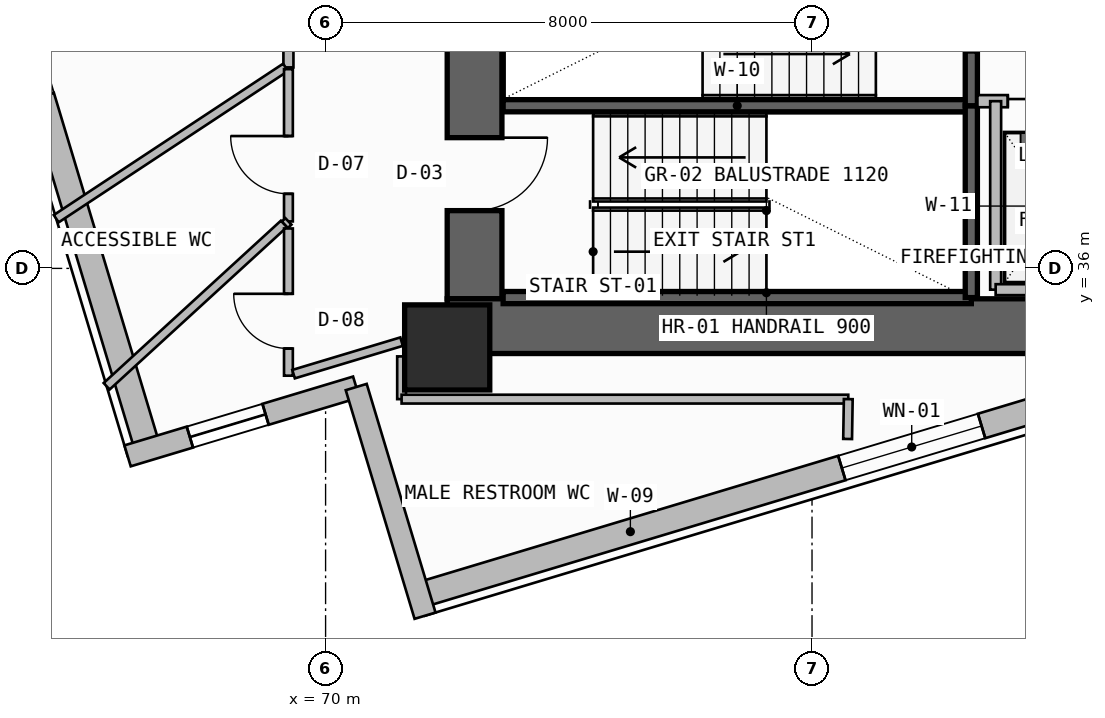
"""IFC4 building model, lengths in metres.
Left out: names, types, materials, properties, quantities, classifications, styles, units other than length and angle.
Written with IfcOpenShell. Run it as: python <this file> out.ifc"""

import sys

from ifc_helpers import new_model, si_unit, direction, frame, frame_2d, origin, origin_2d, place, context, subcontext, project, spatial, rectangle, extrude, element, fill, save


model = new_model("IFC4")
c1 = context("Model", 3, precision=1e-05, world=origin(), true_north=direction((0.0, 1.0)))
c2 = subcontext(c1, "Body", "Model", "MODEL_VIEW")
j1 = project(units=[si_unit("LENGTHUNIT", "METRE"), si_unit("PLANEANGLEUNIT", "RADIAN")], contexts=[c1])
p1 = place(None, origin())
s1 = spatial("IfcSite", under=j1, at=p1, CompositionType="ELEMENT")
p2 = place(p1, origin())
s2 = spatial("IfcBuilding", under=s1, at=p2, CompositionType="ELEMENT")
p3 = place(p2, frame((0.0, 0.0, 157.5)))
s3 = spatial("IfcBuildingStorey", under=s2, at=p3, CompositionType="ELEMENT", Elevation=157.5)
p4 = place(p3, frame((72.45, 35.5, -0.26), z_axis=(0.0, 0.0, 1.0), x_axis=(0.0, 1.0, 0.0)))
e1 = element("IfcWall", 1, at=p4, inside=s3, PredefinedType="SHEAR", context=c2, shape_type="SweptSolid", body=[
    extrude(rectangle(XDim=7.85, YDim=0.9, at=frame_2d((3.925, 0.0))), origin(), (0.0, 0.0, 1.0), 3.6),
])
p5 = place(p4, frame((1.45, 0.0, 0.26)))
e2 = element("IfcOpeningElement", 2, at=p5, cuts=e1, PredefinedType="OPENING", context=c2, shape_type="SweptSolid", body=[
    extrude(rectangle(XDim=1.2, YDim=2.2, at=frame_2d((0.6, 1.1))), frame((0.0, 0.46, 0.0), z_axis=(0.0, -1.0, 0.0), x_axis=(1.0, 0.0, 0.0)), (0.0, 0.0, 1.0), 0.92),
])
p6 = place(p3, frame((72.0, 35.05, -0.26), z_axis=(0.0, 0.0, 1.0), x_axis=(1.0, 0.0, 0.0)))
e3 = element("IfcWall", 3, at=p6, inside=s3, PredefinedType="SHEAR", context=c2, shape_type="SweptSolid", body=[
    extrude(rectangle(XDim=13.9, YDim=0.9, at=frame_2d((6.95, 0.0))), origin(), (0.0, 0.0, 1.0), 3.6),
])
p7 = place(p3, frame((72.0, 34.7, 0.0), z_axis=(0.0, 0.0, 1.0), x_axis=(1.0, 0.0, 0.0)))
e4 = element("IfcColumn", 4, at=p7, inside=s3, PredefinedType="COLUMN", context=c2, shape_type="SweptSolid", body=[
    extrude(rectangle(XDim=1.4, YDim=1.4, at=origin_2d()), origin(), (0.0, 0.0, 1.0), 3.6),
])
p8 = place(p3, frame((71.535, 30.624, 0.0), z_axis=(0.0, 0.0, 1.0), x_axis=(0.957571099539, 0.288197136226, 0.0)))
e5 = element("IfcWall", 5, at=p8, inside=s3, PredefinedType="SOLIDWALL", context=c2, shape_type="SweptSolid", body=[
    extrude(rectangle(XDim=12.236, YDim=0.42, at=frame_2d((6.118, 0.0))), origin(), (0.0, 0.0, 1.0), 3.34),
])
p9 = place(p8, frame((7.264, 0.0, 1.2)))
e6 = element("IfcOpeningElement", 6, at=p9, cuts=e5, PredefinedType="OPENING", context=c2, shape_type="SweptSolid", body=[
    extrude(rectangle(XDim=2.4, YDim=0.9, at=frame_2d((1.2, 0.45))), frame((0.0, 0.22, 0.0), z_axis=(0.0, -1.0, 0.0), x_axis=(1.0, 0.0, 0.0)), (0.0, 0.0, 1.0), 0.44),
])
p10 = place(p3, frame((63.221, 45.834, 0.0), z_axis=(0.0, 0.0, 1.0), x_axis=(0.288202962273, -0.957569346072, 0.0)))
e7 = element("IfcWall", 7, at=p10, inside=s3, PredefinedType="SOLIDWALL", context=c2, shape_type="SweptSolid", body=[
    extrude(rectangle(XDim=13.384, YDim=0.42, at=frame_2d((6.692, 0.0))), origin(), (0.0, 0.0, 1.0), 2.725),
])
p11 = place(p10, frame((5.517, 0.0, 1.2)))
e8 = element("IfcOpeningElement", 8, at=p11, cuts=e7, PredefinedType="OPENING", context=c2, shape_type="SweptSolid", body=[
    extrude(rectangle(XDim=1.8, YDim=0.9, at=frame_2d((0.9, 0.45))), frame((0.0, 0.22, 0.0), z_axis=(0.0, -1.0, 0.0), x_axis=(1.0, 0.0, 0.0)), (0.0, 0.0, 1.0), 0.44),
])
p12 = place(p3, frame((66.743, 32.917, 0.0), z_axis=(0.0, 0.0, 1.0), x_axis=(0.957584687378, 0.288151985068, 0.0)))
e9 = element("IfcWall", 9, at=p12, inside=s3, PredefinedType="SOLIDWALL", context=c2, shape_type="SweptSolid", body=[
    extrude(rectangle(XDim=3.927, YDim=0.36, at=frame_2d((1.963, 0.0))), origin(), (0.0, 0.0, 1.0), 3.34),
])
p13 = place(p12, frame((1.07, 0.0, 0.45)))
e10 = element("IfcOpeningElement", 10, at=p13, cuts=e9, PredefinedType="OPENING", context=c2, shape_type="SweptSolid", body=[
    extrude(rectangle(XDim=1.3, YDim=2.4, at=frame_2d((0.65, 1.2))), frame((0.0, 0.19, 0.0), z_axis=(0.0, -1.0, 0.0), x_axis=(1.0, 0.0, 0.0)), (0.0, 0.0, 1.0), 0.38),
])
p14 = place(p3, frame((70.504, 34.049, 0.0), z_axis=(0.0, 0.0, 1.0), x_axis=(0.288169140251, -0.957579524952, 0.0)))
e11 = element("IfcWall", 11, at=p14, inside=s3, PredefinedType="SOLIDWALL", context=c2, shape_type="SweptSolid", body=[
    extrude(rectangle(XDim=3.927, YDim=0.36, at=frame_2d((1.963, 0.0))), origin(), (0.0, 0.0, 1.0), 3.34),
])
for number, where, z_axis, x_axis in (
    (12, (72.92, 35.52, -0.26), (0.0, 0.0, 1.0), (1.0, 0.0, 0.0)),
    (13, (72.92, 38.675, -0.26), (0.0, 0.0, 1.0), (1.0, 0.0, 0.0)),
):
    element("IfcWall", number, at=place(p3, frame(where, z_axis=z_axis, x_axis=x_axis)), inside=s3, PredefinedType="SOLIDWALL", context=c2, shape_type="SweptSolid", body=[
        extrude(rectangle(XDim=7.7, YDim=0.2, at=frame_2d((3.85, 0.0))), origin(), (0.0, 0.0, 1.0), 3.6),
    ])
p15 = place(p3, frame((80.62, 35.52, -0.26), z_axis=(0.0, 0.0, 1.0), x_axis=(0.0, 1.0, 0.0)))
e14 = element("IfcWall", 14, at=p15, inside=s3, PredefinedType="SOLIDWALL", context=c2, shape_type="SweptSolid", body=[
    extrude(rectangle(XDim=3.155, YDim=0.2, at=frame_2d((1.578, 0.0))), origin(), (0.0, 0.0, 1.0), 3.6),
])
p16 = place(p3, frame((80.62, 38.675, -0.26), z_axis=(0.0, 0.0, 1.0), x_axis=(0.0, 1.0, 0.0)))
e15 = element("IfcWall", 15, at=p16, inside=s3, PredefinedType="SOLIDWALL", context=c2, shape_type="SweptSolid", body=[
    extrude(rectangle(XDim=3.245, YDim=0.2, at=frame_2d((1.623, 0.0))), origin(), (0.0, 0.0, 1.0), 3.6),
])
p17 = place(p16, frame((0.9, 0.0, 0.26)))
e16 = element("IfcOpeningElement", 16, at=p17, cuts=e15, PredefinedType="OPENING", context=c2, shape_type="SweptSolid", body=[
    extrude(rectangle(XDim=1.2, YDim=2.2, at=frame_2d((0.6, 1.1))), frame((0.0, 0.11, 0.0), z_axis=(0.0, -1.0, 0.0), x_axis=(1.0, 0.0, 0.0)), (0.0, 0.0, 1.0), 0.22),
])
p18 = place(p3, frame((80.72, 38.75, 0.0), z_axis=(0.0, 0.0, 1.0), x_axis=(1.0, 0.0, 0.0)))
e17 = element("IfcWall", 17, at=p18, inside=s3, PredefinedType="SOLIDWALL", context=c2, shape_type="SweptSolid", body=[
    extrude(rectangle(XDim=4.26, YDim=0.2, at=frame_2d((2.13, 0.0))), origin(), (0.0, 0.0, 1.0), 3.34),
])
p19 = place(p18, frame((0.5, 0.0, 0.0)))
e18 = element("IfcOpeningElement", 18, at=p19, cuts=e17, PredefinedType="OPENING", context=c2, shape_type="SweptSolid", body=[
    extrude(rectangle(XDim=1.3, YDim=2.3, at=frame_2d((0.65, 1.15))), frame((0.0, 0.11, 0.0), z_axis=(0.0, -1.0, 0.0), x_axis=(1.0, 0.0, 0.0)), (0.0, 0.0, 1.0), 0.22),
])
p20 = place(p18, frame((2.45, 0.0, 0.0)))
e19 = element("IfcOpeningElement", 19, at=p20, cuts=e17, PredefinedType="OPENING", context=c2, shape_type="SweptSolid", body=[
    extrude(rectangle(XDim=1.3, YDim=2.3, at=frame_2d((0.65, 1.15))), frame((0.0, 0.11, 0.0), z_axis=(0.0, -1.0, 0.0), x_axis=(1.0, 0.0, 0.0)), (0.0, 0.0, 1.0), 0.22),
])
p21 = place(p3, frame((81.02, 35.65, 0.0), z_axis=(0.0, 0.0, 1.0), x_axis=(0.0, 1.0, 0.0)))
e20 = element("IfcWall", 20, at=p21, inside=s3, PredefinedType="SOLIDWALL", context=c2, shape_type="SweptSolid", body=[
    extrude(rectangle(XDim=3.1, YDim=0.18, at=frame_2d((1.55, 0.0))), origin(), (0.0, 0.0, 1.0), 3.34),
])
p22 = place(p3, frame((81.02, 35.65, 0.0), z_axis=(0.0, 0.0, 1.0), x_axis=(1.0, 0.0, 0.0)))
e21 = element("IfcWall", 21, at=p22, inside=s3, PredefinedType="SOLIDWALL", context=c2, shape_type="SweptSolid", body=[
    extrude(rectangle(XDim=3.93, YDim=0.18, at=frame_2d((1.965, 0.0))), origin(), (0.0, 0.0, 1.0), 3.34),
])
p23 = place(p3, frame((69.389, 49.274, 0.0), z_axis=(0.0, 0.0, 1.0), x_axis=(0.0, -1.0, 0.0)))
e22 = element("IfcWall", 22, at=p23, inside=s3, PredefinedType="PARTITIONING", context=c2, shape_type="SweptSolid", body=[
    extrude(rectangle(XDim=9.968, YDim=0.165, at=frame_2d((4.984, 0.0))), origin(), (0.0, 0.0, 1.0), 3.34),
])
p24 = place(p23, frame((4.484, 0.0, 0.0)))
e23 = element("IfcOpeningElement", 23, at=p24, cuts=e22, PredefinedType="OPENING", context=c2, shape_type="SweptSolid", body=[
    extrude(rectangle(XDim=1.0, YDim=2.2, at=frame_2d((0.5, 1.1))), frame((0.0, 0.093, 0.0), z_axis=(0.0, -1.0, 0.0), x_axis=(1.0, 0.0, 0.0)), (0.0, 0.0, 1.0), 0.185),
])
p25 = place(p3, frame((69.342, 39.306, 0.0), z_axis=(0.0, 0.0, 1.0), x_axis=(-0.83472512809, -0.550666832608, 0.0)))
e24 = element("IfcWall", 24, at=p25, inside=s3, PredefinedType="PARTITIONING", context=c2, shape_type="SweptSolid", body=[
    extrude(rectangle(XDim=4.519, YDim=0.145, at=frame_2d((2.26, 0.0))), origin(), (0.0, 0.0, 1.0), 3.34),
])
p26 = place(p3, frame((69.389, 39.277, 0.0), z_axis=(0.0, 0.0, 1.0), x_axis=(0.0, -1.0, 0.0)))
e25 = element("IfcWall", 25, at=p26, inside=s3, PredefinedType="PARTITIONING", context=c2, shape_type="SweptSolid", body=[
    extrude(rectangle(XDim=2.504, YDim=0.145, at=frame_2d((1.252, 0.0))), origin(), (0.0, 0.0, 1.0), 3.34),
])
p27 = place(p26, frame((1.1, 0.0, 0.0)))
e26 = element("IfcOpeningElement", 26, at=p27, cuts=e25, PredefinedType="OPENING", context=c2, shape_type="SweptSolid", body=[
    extrude(rectangle(XDim=0.95, YDim=2.15, at=frame_2d((0.475, 1.075))), frame((0.0, 0.083, 0.0), z_axis=(0.0, -1.0, 0.0), x_axis=(1.0, 0.0, 0.0)), (0.0, 0.0, 1.0), 0.165),
])
p28 = place(p3, frame((69.389, 36.773, 0.0), z_axis=(0.0, 0.0, 1.0), x_axis=(-0.730366580174, -0.683055384698, 0.0)))
e27 = element("IfcWall", 27, at=p28, inside=s3, PredefinedType="PARTITIONING", context=c2, shape_type="SweptSolid", body=[
    extrude(rectangle(XDim=0.083, YDim=0.145, at=frame_2d((0.041, 0.0))), origin(), (0.0, 0.0, 1.0), 3.34),
])
p29 = place(p3, frame((69.314, 36.731, 0.0), z_axis=(0.0, 0.0, 1.0), x_axis=(-0.737487298625, -0.675361002995, 0.0)))
e28 = element("IfcWall", 28, at=p29, inside=s3, PredefinedType="PARTITIONING", context=c2, shape_type="SweptSolid", body=[
    extrude(rectangle(XDim=3.953, YDim=0.145, at=frame_2d((1.977, 0.0))), origin(), (0.0, 0.0, 1.0), 3.34),
])
p30 = place(p3, frame((69.389, 36.657, 0.0), z_axis=(0.0, 0.0, 1.0), x_axis=(0.0, -1.0, 0.0)))
e29 = element("IfcWall", 29, at=p30, inside=s3, PredefinedType="PARTITIONING", context=c2, shape_type="SweptSolid", body=[
    extrude(rectangle(XDim=2.421, YDim=0.145, at=frame_2d((1.21, 0.0))), origin(), (0.0, 0.0, 1.0), 3.34),
])
p31 = place(p30, frame((1.074, 0.0, 0.0)))
e30 = element("IfcOpeningElement", 30, at=p31, cuts=e29, PredefinedType="OPENING", context=c2, shape_type="SweptSolid", body=[
    extrude(rectangle(XDim=0.9, YDim=2.1, at=frame_2d((0.45, 1.05))), frame((0.0, 0.083, 0.0), z_axis=(0.0, -1.0, 0.0), x_axis=(1.0, 0.0, 0.0)), (0.0, 0.0, 1.0), 0.165),
])
p32 = place(p3, frame((69.473, 34.261, 0.0), z_axis=(0.0, 0.0, 1.0), x_axis=(0.957576023878, 0.288180773985, 0.0)))
e31 = element("IfcWall", 31, at=p32, inside=s3, PredefinedType="PARTITIONING", context=c2, shape_type="SweptSolid", body=[
    extrude(rectangle(XDim=1.855, YDim=0.145, at=frame_2d((0.928, 0.0))), origin(), (0.0, 0.0, 1.0), 3.34),
])
p33 = place(p3, frame((71.25, 34.553, 0.0), z_axis=(0.0, 0.0, 1.0), x_axis=(0.0, -1.0, 0.0)))
e32 = element("IfcWall", 32, at=p33, inside=s3, PredefinedType="PARTITIONING", context=c2, shape_type="SweptSolid", body=[
    extrude(rectangle(XDim=0.703, YDim=0.145, at=frame_2d((0.351, 0.0))), origin(), (0.0, 0.0, 1.0), 3.34),
])
p34 = place(p3, frame((71.25, 33.85, 0.0), z_axis=(0.0, 0.0, 1.0), x_axis=(1.0, 0.0, 0.0)))
e33 = element("IfcWall", 33, at=p34, inside=s3, PredefinedType="PARTITIONING", context=c2, shape_type="SweptSolid", body=[
    extrude(rectangle(XDim=7.346, YDim=0.145, at=frame_2d((3.673, 0.0))), origin(), (0.0, 0.0, 1.0), 3.34),
])
p35 = place(p3, frame((78.596, 33.85, 0.0), z_axis=(0.0, 0.0, 1.0), x_axis=(-0.016385137134, -0.99986575463, 0.0)))
e34 = element("IfcWall", 34, at=p35, inside=s3, PredefinedType="PARTITIONING", context=c2, shape_type="SweptSolid", body=[
    extrude(rectangle(XDim=0.656, YDim=0.145, at=frame_2d((0.328, 0.0))), origin(), (0.0, 0.0, 1.0), 3.34),
])
p36 = place(p9, origin())
e35 = element("IfcWindow", 35, at=p36, inside=s3, PartitioningType="SINGLE_PANEL", PredefinedType="WINDOW", context=c2, shape_type="SweptSolid", body=[
    extrude(rectangle(XDim=2.4, YDim=0.9, at=frame_2d((1.2, 0.45))), frame((0.0, 0.03, 0.0), z_axis=(0.0, -1.0, 0.0), x_axis=(1.0, 0.0, 0.0)), (0.0, 0.0, 1.0), 0.06),
])
fill(e6, e35)
p37 = place(p13, origin())
e36 = element("IfcWindow", 36, at=p37, inside=s3, PartitioningType="SINGLE_PANEL", PredefinedType="WINDOW", context=c2, shape_type="SweptSolid", body=[
    extrude(rectangle(XDim=1.3, YDim=2.4, at=frame_2d((0.65, 1.2))), frame((0.0, 0.03, 0.0), z_axis=(0.0, -1.0, 0.0), x_axis=(1.0, 0.0, 0.0)), (0.0, 0.0, 1.0), 0.06),
])
fill(e10, e36)
p38 = place(p5, frame((1.2, 0.0, 0.0), z_axis=(0.0, 0.0, 1.0), x_axis=(-1.0, 0.0, 0.0)))
e37 = element("IfcDoor", 37, at=p38, inside=s3, OperationType="SINGLE_SWING_LEFT", PredefinedType="USERDEFINED", context=c2, shape_type="SweptSolid", body=[
    extrude(rectangle(XDim=1.2, YDim=2.2, at=frame_2d((0.6, 1.1))), frame((0.0, 0.025, 0.0), z_axis=(0.0, -1.0, 0.0), x_axis=(1.0, 0.0, 0.0)), (0.0, 0.0, 1.0), 0.05),
])
fill(e2, e37)
p39 = place(p19, origin())
e38 = element("IfcDoor", 38, at=p39, inside=s3, OperationType="DOUBLE_DOOR_SLIDING", PredefinedType="DOOR", context=c2, shape_type="SweptSolid", body=[
    extrude(rectangle(XDim=1.3, YDim=2.3, at=frame_2d((0.65, 1.15))), frame((0.0, 0.025, 0.0), z_axis=(0.0, -1.0, 0.0), x_axis=(1.0, 0.0, 0.0)), (0.0, 0.0, 1.0), 0.05),
])
fill(e18, e38)
p40 = place(p27, frame((0.95, 0.0, 0.0), z_axis=(0.0, 0.0, 1.0), x_axis=(-1.0, 0.0, 0.0)))
e39 = element("IfcDoor", 39, at=p40, inside=s3, OperationType="SINGLE_SWING_RIGHT", PredefinedType="DOOR", context=c2, shape_type="SweptSolid", body=[
    extrude(rectangle(XDim=0.95, YDim=2.15, at=frame_2d((0.475, 1.075))), frame((0.0, 0.025, 0.0), z_axis=(0.0, -1.0, 0.0), x_axis=(1.0, 0.0, 0.0)), (0.0, 0.0, 1.0), 0.05),
])
fill(e26, e39)
p41 = place(p31, frame((0.9, 0.0, 0.0), z_axis=(0.0, 0.0, 1.0), x_axis=(-1.0, 0.0, 0.0)))
e40 = element("IfcDoor", 40, at=p41, inside=s3, OperationType="SINGLE_SWING_RIGHT", PredefinedType="DOOR", context=c2, shape_type="SweptSolid", body=[
    extrude(rectangle(XDim=0.9, YDim=2.1, at=frame_2d((0.45, 1.05))), frame((0.0, 0.025, 0.0), z_axis=(0.0, -1.0, 0.0), x_axis=(1.0, 0.0, 0.0)), (0.0, 0.0, 1.0), 0.05),
])
fill(e30, e40)
save(model, sys.argv[1])
